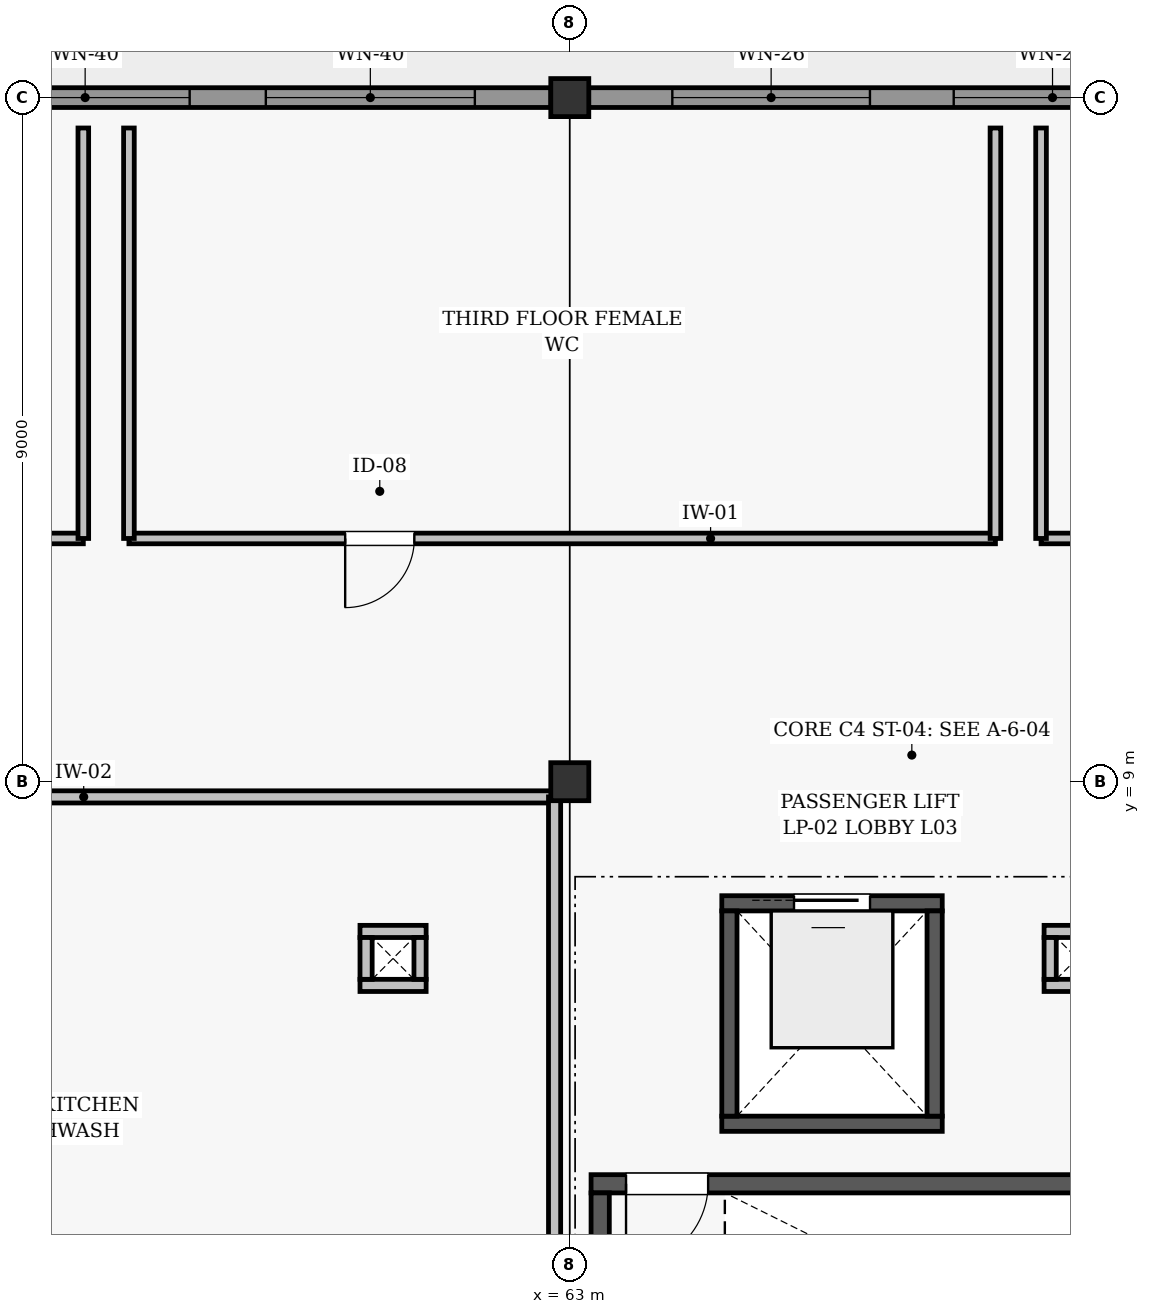
"""IFC4 building model, lengths in metres.
Left out: names, types, materials, properties, quantities, classifications, styles, units other than length and angle.
Written with IfcOpenShell. Run it as: python <this file> out.ifc"""

import sys

from ifc_helpers import new_model, si_unit, direction, frame, frame_2d, origin, origin_2d, place, context, subcontext, project, spatial, rectangle, extrude, element, fill, save


model = new_model("IFC4")
c1 = context("Model", 3, precision=1e-05, world=origin(), true_north=direction((0.0, 1.0)))
c2 = subcontext(c1, "Body", "Model", "MODEL_VIEW")
j1 = project(units=[si_unit("LENGTHUNIT", "METRE"), si_unit("PLANEANGLEUNIT", "RADIAN")], contexts=[c1])
p1 = place(None, origin())
s1 = spatial("IfcSite", under=j1, at=p1, CompositionType="ELEMENT")
p2 = place(p1, origin())
s2 = spatial("IfcBuilding", under=s1, at=p2, CompositionType="ELEMENT")
p3 = place(p2, frame((0.0, 0.0, 12.0)))
s3 = spatial("IfcBuildingStorey", under=s2, at=p3, CompositionType="ELEMENT", Elevation=12.0)
for number, where, z_axis, x_axis in (
    (1, (63.0, 9.0, 0.0), (0.0, 0.0, 1.0), (1.0, 0.0, 0.0)),
    (2, (63.0, 18.0, 0.0), (0.0, 0.0, 1.0), (1.0, 0.0, 0.0)),
):
    element("IfcColumn", number, at=place(p3, frame(where, z_axis=z_axis, x_axis=x_axis)), inside=s3, PredefinedType="COLUMN", context=c2, shape_type="SweptSolid", body=[
        extrude(rectangle(XDim=0.5, YDim=0.5, at=origin_2d()), origin(), (0.0, 0.0, 1.0), 3.0),
    ])
p4 = place(p3, frame((54.248, 18.0, 0.0), z_axis=(0.0, 0.0, 1.0), x_axis=(1.0, 0.0, 0.0)))
e3 = element("IfcWall", 3, at=p4, inside=s3, PredefinedType="SOLIDWALL", context=c2, shape_type="SweptSolid", body=[
    extrude(rectangle(XDim=8.504, YDim=0.26, at=frame_2d((4.252, 0.0))), origin(), (0.0, 0.0, 1.0), 2.322),
])
p5 = place(p4, frame((1.001, 0.0, 0.86)))
e4 = element("IfcOpeningElement", 4, at=p5, cuts=e3, PredefinedType="OPENING", context=c2, shape_type="SweptSolid", body=[
    extrude(rectangle(XDim=2.75, YDim=1.28, at=frame_2d((1.375, 0.64))), frame((0.0, 0.14, 0.0), z_axis=(0.0, -1.0, 0.0), x_axis=(1.0, 0.0, 0.0)), (0.0, 0.0, 1.0), 0.28),
])
p6 = place(p4, frame((4.753, 0.0, 0.86)))
e5 = element("IfcOpeningElement", 5, at=p6, cuts=e3, PredefinedType="OPENING", context=c2, shape_type="SweptSolid", body=[
    extrude(rectangle(XDim=2.75, YDim=1.28, at=frame_2d((1.375, 0.64))), frame((0.0, 0.14, 0.0), z_axis=(0.0, -1.0, 0.0), x_axis=(1.0, 0.0, 0.0)), (0.0, 0.0, 1.0), 0.28),
])
p7 = place(p3, frame((63.248, 18.0, 0.0), z_axis=(0.0, 0.0, 1.0), x_axis=(1.0, 0.0, 0.0)))
e6 = element("IfcWall", 6, at=p7, inside=s3, PredefinedType="SOLIDWALL", context=c2, shape_type="SweptSolid", body=[
    extrude(rectangle(XDim=8.504, YDim=0.26, at=frame_2d((4.252, 0.0))), origin(), (0.0, 0.0, 1.0), 2.322),
])
p8 = place(p7, frame((1.101, 0.0, 0.9)))
e7 = element("IfcOpeningElement", 7, at=p8, cuts=e6, PredefinedType="OPENING", context=c2, shape_type="SweptSolid", body=[
    extrude(rectangle(XDim=2.6, YDim=1.24, at=frame_2d((1.3, 0.62))), frame((0.0, 0.14, 0.0), z_axis=(0.0, -1.0, 0.0), x_axis=(1.0, 0.0, 0.0)), (0.0, 0.0, 1.0), 0.28),
])
p9 = place(p7, frame((4.803, 0.0, 0.9)))
e8 = element("IfcOpeningElement", 8, at=p9, cuts=e6, PredefinedType="OPENING", context=c2, shape_type="SweptSolid", body=[
    extrude(rectangle(XDim=2.6, YDim=1.24, at=frame_2d((1.3, 0.62))), frame((0.0, 0.14, 0.0), z_axis=(0.0, -1.0, 0.0), x_axis=(1.0, 0.0, 0.0)), (0.0, 0.0, 1.0), 0.28),
])
p10 = place(p3, frame((63.28, 3.71, 0.0), z_axis=(0.0, 0.0, 1.0), x_axis=(1.0, 0.0, 0.0)))
e9 = element("IfcWall", 9, at=p10, inside=s3, PredefinedType="SHEAR", context=c2, shape_type="SweptSolid", body=[
    extrude(rectangle(XDim=8.44, YDim=0.24, at=frame_2d((4.22, 0.0))), origin(), (0.0, 0.0, 1.0), 2.75),
])
p11 = place(p10, frame((0.46, 0.0, 0.0)))
e10 = element("IfcOpeningElement", 10, at=p11, cuts=e9, PredefinedType="OPENING", context=c2, shape_type="SweptSolid", body=[
    extrude(rectangle(XDim=1.08, YDim=2.08, at=frame_2d((0.54, 1.04))), frame((0.0, 0.13, 0.0), z_axis=(0.0, -1.0, 0.0), x_axis=(1.0, 0.0, 0.0)), (0.0, 0.0, 1.0), 0.26),
])
p12 = place(p3, frame((63.4, 0.4, 0.0), z_axis=(0.0, 0.0, 1.0), x_axis=(0.0, 1.0, 0.0)))
e11 = element("IfcWall", 11, at=p12, inside=s3, PredefinedType="SHEAR", context=c2, shape_type="SweptSolid", body=[
    extrude(rectangle(XDim=3.19, YDim=0.24, at=frame_2d((1.595, 0.0))), origin(), (0.0, 0.0, 1.0), 2.75),
])
p13 = place(p3, frame((65.0, 4.5, 0.0), z_axis=(0.0, 0.0, 1.0), x_axis=(1.0, 0.0, 0.0)))
e12 = element("IfcWall", 12, at=p13, inside=s3, PredefinedType="SHEAR", context=c2, shape_type="SweptSolid", body=[
    extrude(rectangle(XDim=2.9, YDim=0.2, at=frame_2d((1.45, 0.0))), origin(), (0.0, 0.0, 1.0), 2.75),
])
p14 = place(p3, frame((65.0, 7.4, 0.0), z_axis=(0.0, 0.0, 1.0), x_axis=(1.0, 0.0, 0.0)))
e13 = element("IfcWall", 13, at=p14, inside=s3, PredefinedType="SHEAR", context=c2, shape_type="SweptSolid", body=[
    extrude(rectangle(XDim=2.9, YDim=0.2, at=frame_2d((1.45, 0.0))), origin(), (0.0, 0.0, 1.0), 2.75),
])
p15 = place(p14, frame((0.95, 0.0, 0.0)))
e14 = element("IfcOpeningElement", 14, at=p15, cuts=e13, PredefinedType="OPENING", context=c2, shape_type="SweptSolid", body=[
    extrude(rectangle(XDim=1.0, YDim=2.1, at=frame_2d((0.5, 1.05))), frame((0.0, 0.11, 0.0), z_axis=(0.0, -1.0, 0.0), x_axis=(1.0, 0.0, 0.0)), (0.0, 0.0, 1.0), 0.22),
])
for number, where, z_axis, x_axis in (
    (15, (65.1, 4.6, 0.0), (0.0, 0.0, 1.0), (0.0, 1.0, 0.0)),
    (16, (67.8, 4.6, 0.0), (0.0, 0.0, 1.0), (0.0, 1.0, 0.0)),
):
    element("IfcWall", number, at=place(p3, frame(where, z_axis=z_axis, x_axis=x_axis)), inside=s3, PredefinedType="SHEAR", context=c2, shape_type="SweptSolid", body=[
        extrude(rectangle(XDim=2.7, YDim=0.2, at=frame_2d((1.35, 0.0))), origin(), (0.0, 0.0, 1.0), 2.75),
    ])
for number, where, z_axis, x_axis in (
    (17, (60.24, 6.32, 0.0), (0.0, 0.0, 1.0), (1.0, 0.0, 0.0)),
    (18, (60.24, 7.03, 0.0), (0.0, 0.0, 1.0), (1.0, 0.0, 0.0)),
):
    element("IfcWall", number, at=place(p3, frame(where, z_axis=z_axis, x_axis=x_axis)), inside=s3, PredefinedType="PARTITIONING", context=c2, shape_type="SweptSolid", body=[
        extrude(rectangle(XDim=0.87, YDim=0.16, at=frame_2d((0.435, 0.0))), origin(), (0.0, 0.0, 1.0), 2.75),
    ])
for number, where, z_axis, x_axis in (
    (19, (60.32, 6.4, 0.0), (0.0, 0.0, 1.0), (0.0, 1.0, 0.0)),
    (20, (61.03, 6.4, 0.0), (0.0, 0.0, 1.0), (0.0, 1.0, 0.0)),
):
    element("IfcWall", number, at=place(p3, frame(where, z_axis=z_axis, x_axis=x_axis)), inside=s3, PredefinedType="PARTITIONING", context=c2, shape_type="SweptSolid", body=[
        extrude(rectangle(XDim=0.55, YDim=0.16, at=frame_2d((0.275, 0.0))), origin(), (0.0, 0.0, 1.0), 2.75),
    ])
for number, where, z_axis, x_axis in (
    (21, (69.24, 6.32, 0.0), (0.0, 0.0, 1.0), (1.0, 0.0, 0.0)),
    (22, (69.24, 7.03, 0.0), (0.0, 0.0, 1.0), (1.0, 0.0, 0.0)),
):
    element("IfcWall", number, at=place(p3, frame(where, z_axis=z_axis, x_axis=x_axis)), inside=s3, PredefinedType="PARTITIONING", context=c2, shape_type="SweptSolid", body=[
        extrude(rectangle(XDim=0.87, YDim=0.16, at=frame_2d((0.435, 0.0))), origin(), (0.0, 0.0, 1.0), 2.75),
    ])
p16 = place(p3, frame((69.32, 6.4, 0.0), z_axis=(0.0, 0.0, 1.0), x_axis=(0.0, 1.0, 0.0)))
e23 = element("IfcWall", 23, at=p16, inside=s3, PredefinedType="PARTITIONING", context=c2, shape_type="SweptSolid", body=[
    extrude(rectangle(XDim=0.55, YDim=0.16, at=frame_2d((0.275, 0.0))), origin(), (0.0, 0.0, 1.0), 2.75),
])
p17 = place(p3, frame((45.2, 8.8, 0.0), z_axis=(0.0, 0.0, 1.0), x_axis=(1.0, 0.0, 0.0)))
e24 = element("IfcWall", 24, at=p17, inside=s3, PredefinedType="PARTITIONING", context=c2, shape_type="SweptSolid", body=[
    extrude(rectangle(XDim=17.6, YDim=0.16, at=frame_2d((8.8, 0.0))), origin(), (0.0, 0.0, 1.0), 2.295),
])
p18 = place(p17, frame((3.54, 0.0, 0.0)))
e25 = element("IfcOpeningElement", 25, at=p18, cuts=e24, PredefinedType="OPENING", context=c2, shape_type="SweptSolid", body=[
    extrude(rectangle(XDim=1.52, YDim=2.16, at=frame_2d((0.76, 1.08))), frame((0.0, 0.09, 0.0), z_axis=(0.0, -1.0, 0.0), x_axis=(1.0, 0.0, 0.0)), (0.0, 0.0, 1.0), 0.18),
])
p19 = place(p3, frame((62.8, 0.4, 0.0), z_axis=(0.0, 0.0, 1.0), x_axis=(0.0, 1.0, 0.0)))
e26 = element("IfcWall", 26, at=p19, inside=s3, PredefinedType="PARTITIONING", context=c2, shape_type="SweptSolid", body=[
    extrude(rectangle(XDim=8.4, YDim=0.16, at=frame_2d((4.2, 0.0))), origin(), (0.0, 0.0, 1.0), 2.355),
])
p20 = place(p3, frame((45.4, 12.2, 0.0), z_axis=(0.0, 0.0, 1.0), x_axis=(1.0, 0.0, 0.0)))
e27 = element("IfcWall", 27, at=p20, inside=s3, PredefinedType="PARTITIONING", context=c2, shape_type="SweptSolid", body=[
    extrude(rectangle(XDim=11.2, YDim=0.14, at=frame_2d((5.6, 0.0))), origin(), (0.0, 0.0, 1.0), 2.295),
])
p21 = place(p20, frame((3.645, 0.0, 0.0)))
e28 = element("IfcOpeningElement", 28, at=p21, cuts=e27, PredefinedType="OPENING", context=c2, shape_type="SweptSolid", body=[
    extrude(rectangle(XDim=0.91, YDim=2.04, at=frame_2d((0.455, 1.02))), frame((0.0, 0.08, 0.0), z_axis=(0.0, -1.0, 0.0), x_axis=(1.0, 0.0, 0.0)), (0.0, 0.0, 1.0), 0.16),
])
p22 = place(p3, frame((56.6, 12.2, 0.0), z_axis=(0.0, 0.0, 1.0), x_axis=(0.0, 1.0, 0.0)))
e29 = element("IfcWall", 29, at=p22, inside=s3, PredefinedType="PARTITIONING", context=c2, shape_type="SweptSolid", body=[
    extrude(rectangle(XDim=5.4, YDim=0.14, at=frame_2d((2.7, 0.0))), origin(), (0.0, 0.0, 1.0), 2.75),
])
p23 = place(p3, frame((57.2, 12.2, 0.0), z_axis=(0.0, 0.0, 1.0), x_axis=(1.0, 0.0, 0.0)))
e30 = element("IfcWall", 30, at=p23, inside=s3, PredefinedType="PARTITIONING", context=c2, shape_type="SweptSolid", body=[
    extrude(rectangle(XDim=11.4, YDim=0.14, at=frame_2d((5.7, 0.0))), origin(), (0.0, 0.0, 1.0), 2.355),
])
p24 = place(p23, frame((2.845, 0.0, 0.0)))
e31 = element("IfcOpeningElement", 31, at=p24, cuts=e30, PredefinedType="OPENING", context=c2, shape_type="SweptSolid", body=[
    extrude(rectangle(XDim=0.91, YDim=2.04, at=frame_2d((0.455, 1.02))), frame((0.0, 0.08, 0.0), z_axis=(0.0, -1.0, 0.0), x_axis=(1.0, 0.0, 0.0)), (0.0, 0.0, 1.0), 0.16),
])
for number, where, z_axis, x_axis in (
    (32, (57.2, 12.2, 0.0), (0.0, 0.0, 1.0), (0.0, 1.0, 0.0)),
    (33, (68.6, 12.2, 0.0), (0.0, 0.0, 1.0), (0.0, 1.0, 0.0)),
):
    element("IfcWall", number, at=place(p3, frame(where, z_axis=z_axis, x_axis=x_axis)), inside=s3, PredefinedType="PARTITIONING", context=c2, shape_type="SweptSolid", body=[
        extrude(rectangle(XDim=5.4, YDim=0.14, at=frame_2d((2.7, 0.0))), origin(), (0.0, 0.0, 1.0), 2.75),
    ])
p25 = place(p3, frame((69.2, 12.2, 0.0), z_axis=(0.0, 0.0, 1.0), x_axis=(1.0, 0.0, 0.0)))
e34 = element("IfcWall", 34, at=p25, inside=s3, PredefinedType="PARTITIONING", context=c2, shape_type="SweptSolid", body=[
    extrude(rectangle(XDim=11.4, YDim=0.14, at=frame_2d((5.7, 0.0))), origin(), (0.0, 0.0, 1.0), 2.305),
])
p26 = place(p25, frame((6.845, 0.0, 0.0)))
e35 = element("IfcOpeningElement", 35, at=p26, cuts=e34, PredefinedType="OPENING", context=c2, shape_type="SweptSolid", body=[
    extrude(rectangle(XDim=0.91, YDim=2.04, at=frame_2d((0.455, 1.02))), frame((0.0, 0.08, 0.0), z_axis=(0.0, -1.0, 0.0), x_axis=(1.0, 0.0, 0.0)), (0.0, 0.0, 1.0), 0.16),
])
p27 = place(p3, frame((69.2, 12.2, 0.0), z_axis=(0.0, 0.0, 1.0), x_axis=(0.0, 1.0, 0.0)))
e36 = element("IfcWall", 36, at=p27, inside=s3, PredefinedType="PARTITIONING", context=c2, shape_type="SweptSolid", body=[
    extrude(rectangle(XDim=5.4, YDim=0.14, at=frame_2d((2.7, 0.0))), origin(), (0.0, 0.0, 1.0), 2.75),
])
p28 = place(p5, origin())
e37 = element("IfcWindow", 37, at=p28, inside=s3, PartitioningType="SINGLE_PANEL", PredefinedType="WINDOW", context=c2, shape_type="SweptSolid", body=[
    extrude(rectangle(XDim=2.75, YDim=1.28, at=frame_2d((1.375, 0.64))), frame((0.0, 0.03, 0.0), z_axis=(0.0, -1.0, 0.0), x_axis=(1.0, 0.0, 0.0)), (0.0, 0.0, 1.0), 0.06),
])
fill(e4, e37)
p29 = place(p6, origin())
e38 = element("IfcWindow", 38, at=p29, inside=s3, PartitioningType="SINGLE_PANEL", PredefinedType="WINDOW", context=c2, shape_type="SweptSolid", body=[
    extrude(rectangle(XDim=2.75, YDim=1.28, at=frame_2d((1.375, 0.64))), frame((0.0, 0.03, 0.0), z_axis=(0.0, -1.0, 0.0), x_axis=(1.0, 0.0, 0.0)), (0.0, 0.0, 1.0), 0.06),
])
fill(e5, e38)
p30 = place(p8, origin())
e39 = element("IfcWindow", 39, at=p30, inside=s3, PartitioningType="SINGLE_PANEL", PredefinedType="WINDOW", context=c2, shape_type="SweptSolid", body=[
    extrude(rectangle(XDim=2.6, YDim=1.24, at=frame_2d((1.3, 0.62))), frame((0.0, 0.03, 0.0), z_axis=(0.0, -1.0, 0.0), x_axis=(1.0, 0.0, 0.0)), (0.0, 0.0, 1.0), 0.06),
])
fill(e7, e39)
p31 = place(p9, origin())
e40 = element("IfcWindow", 40, at=p31, inside=s3, PartitioningType="SINGLE_PANEL", PredefinedType="WINDOW", context=c2, shape_type="SweptSolid", body=[
    extrude(rectangle(XDim=2.6, YDim=1.24, at=frame_2d((1.3, 0.62))), frame((0.0, 0.03, 0.0), z_axis=(0.0, -1.0, 0.0), x_axis=(1.0, 0.0, 0.0)), (0.0, 0.0, 1.0), 0.06),
])
fill(e8, e40)
p32 = place(p11, frame((1.08, 0.0, 0.0), z_axis=(0.0, 0.0, 1.0), x_axis=(-1.0, 0.0, 0.0)))
e41 = element("IfcDoor", 41, at=p32, inside=s3, OperationType="SINGLE_SWING_LEFT", PredefinedType="DOOR", context=c2, shape_type="SweptSolid", body=[
    extrude(rectangle(XDim=1.08, YDim=2.08, at=frame_2d((0.54, 1.04))), frame((0.0, 0.025, 0.0), z_axis=(0.0, -1.0, 0.0), x_axis=(1.0, 0.0, 0.0)), (0.0, 0.0, 1.0), 0.05),
])
fill(e10, e41)
p33 = place(p15, origin())
e42 = element("IfcDoor", 42, at=p33, inside=s3, OperationType="SLIDING_TO_LEFT", PredefinedType="DOOR", context=c2, shape_type="SweptSolid", body=[
    extrude(rectangle(XDim=1.0, YDim=2.1, at=frame_2d((0.5, 1.05))), frame((0.0, 0.025, 0.0), z_axis=(0.0, -1.0, 0.0), x_axis=(1.0, 0.0, 0.0)), (0.0, 0.0, 1.0), 0.05),
])
fill(e14, e42)
p34 = place(p24, frame((0.91, 0.0, 0.0), z_axis=(0.0, 0.0, 1.0), x_axis=(-1.0, 0.0, 0.0)))
e43 = element("IfcDoor", 43, at=p34, inside=s3, OperationType="SINGLE_SWING_LEFT", PredefinedType="DOOR", context=c2, shape_type="SweptSolid", body=[
    extrude(rectangle(XDim=0.91, YDim=2.04, at=frame_2d((0.455, 1.02))), frame((0.0, 0.025, 0.0), z_axis=(0.0, -1.0, 0.0), x_axis=(1.0, 0.0, 0.0)), (0.0, 0.0, 1.0), 0.05),
])
fill(e31, e43)
save(model, sys.argv[1])
